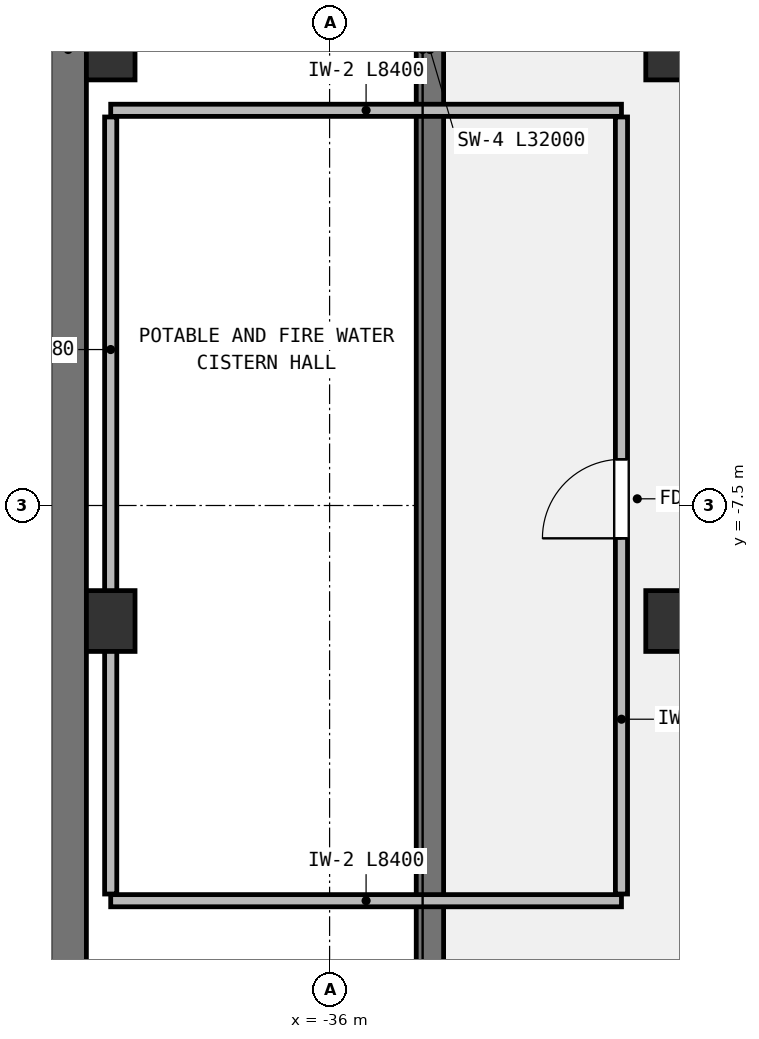
"""IFC4 building model, lengths in metres.
Left out: names, types, materials, properties, quantities, classifications, styles, units other than length and angle.
Written with IfcOpenShell. Run it as: python <this file> out.ifc"""

import sys

from ifc_helpers import new_model, si_unit, direction, frame, frame_2d, origin, origin_2d, place, context, subcontext, project, spatial, rectangle, extrude, element, fill, save


model = new_model("IFC4")
c1 = context("Model", 3, precision=1e-05, world=origin(), true_north=direction((0.0, 1.0)))
c2 = subcontext(c1, "Body", "Model", "MODEL_VIEW")
j1 = project(units=[si_unit("LENGTHUNIT", "METRE"), si_unit("PLANEANGLEUNIT", "RADIAN")], contexts=[c1])
p1 = place(None, origin())
s1 = spatial("IfcSite", under=j1, at=p1, CompositionType="ELEMENT")
p2 = place(p1, origin())
s2 = spatial("IfcBuilding", under=s1, at=p2, CompositionType="ELEMENT")
p3 = place(p2, frame((0.0, 0.0, -13.5)))
s3 = spatial("IfcBuildingStorey", under=s2, at=p3, CompositionType="ELEMENT", Elevation=-13.5)
p4 = place(p3, frame((-40.3, 22.2, 0.0), z_axis=(0.0, 0.0, 1.0), x_axis=(0.0, -1.0, 0.0)))
e1 = element("IfcWall", 1, at=p4, inside=s3, PredefinedType="SOLIDWALL", context=c2, shape_type="SweptSolid", body=[
    extrude(rectangle(XDim=44.4, YDim=0.6, at=frame_2d((22.2, 0.0))), origin(), (0.0, 0.0, 1.0), 4.2),
])
p5 = place(p3, frame((-34.35, -16.0, 0.0), z_axis=(0.0, 0.0, 1.0), x_axis=(0.0, 1.0, 0.0)))
e2 = element("IfcWall", 2, at=p5, inside=s3, PredefinedType="SHEAR", context=c2, shape_type="SweptSolid", body=[
    extrude(rectangle(XDim=32.0, YDim=0.45, at=frame_2d((16.0, 0.0))), origin(), (0.0, 0.0, 1.0), 1.97),
])
for number, where, z_axis, x_axis in (
    (3, (-39.6, -9.4, 0.0), (0.0, 0.0, 1.0), (1.0, 0.0, 0.0)),
    (4, (-39.6, 0.0, 0.0), (0.0, 0.0, 1.0), (1.0, 0.0, 0.0)),
    (5, (-30.4, -9.4, 0.0), (0.0, 0.0, 1.0), (1.0, 0.0, 0.0)),
    (6, (-30.4, 0.0, 0.0), (0.0, 0.0, 1.0), (1.0, 0.0, 0.0)),
):
    element("IfcColumn", number, at=place(p3, frame(where, z_axis=z_axis, x_axis=x_axis)), inside=s3, PredefinedType="COLUMN", context=c2, shape_type="SweptSolid", body=[
        extrude(rectangle(XDim=0.8, YDim=1.0, at=origin_2d()), origin(), (0.0, 0.0, 1.0), 4.5),
    ])
for number, where, z_axis, x_axis in (
    (7, (-39.6, -1.0, 0.0), (0.0, 0.0, 1.0), (1.0, 0.0, 0.0)),
    (8, (-39.6, -14.0, 0.0), (0.0, 0.0, 1.0), (1.0, 0.0, 0.0)),
):
    element("IfcWall", number, at=place(p3, frame(where, z_axis=z_axis, x_axis=x_axis)), inside=s3, PredefinedType="PARTITIONING", context=c2, shape_type="SweptSolid", body=[
        extrude(rectangle(XDim=8.4, YDim=0.2, at=frame_2d((4.2, 0.0))), origin(), (0.0, 0.0, 1.0), 4.2),
    ])
p6 = place(p3, frame((-39.6, -1.11, 0.0), z_axis=(0.0, 0.0, 1.0), x_axis=(0.0, -1.0, 0.0)))
e9 = element("IfcWall", 9, at=p6, inside=s3, PredefinedType="PARTITIONING", context=c2, shape_type="SweptSolid", body=[
    extrude(rectangle(XDim=12.78, YDim=0.2, at=frame_2d((6.39, 0.0))), origin(), (0.0, 0.0, 1.0), 3.18),
])
p7 = place(p3, frame((-31.2, -13.89, 0.0), z_axis=(0.0, 0.0, 1.0), x_axis=(0.0, 1.0, 0.0)))
e10 = element("IfcWall", 10, at=p7, inside=s3, PredefinedType="PARTITIONING", context=c2, shape_type="SweptSolid", body=[
    extrude(rectangle(XDim=12.78, YDim=0.2, at=frame_2d((6.39, 0.0))), origin(), (0.0, 0.0, 1.0), 4.2),
])
p8 = place(p7, frame((5.85, 0.0, 0.0)))
e11 = element("IfcOpeningElement", 11, at=p8, cuts=e10, PredefinedType="OPENING", context=c2, shape_type="SweptSolid", body=[
    extrude(rectangle(XDim=1.3, YDim=2.15, at=frame_2d((0.65, 1.075))), frame((0.0, 0.11, 0.0), z_axis=(0.0, -1.0, 0.0), x_axis=(1.0, 0.0, 0.0)), (0.0, 0.0, 1.0), 0.22),
])
p9 = place(p8, origin())
e12 = element("IfcDoor", 12, at=p9, inside=s3, OperationType="SINGLE_SWING_LEFT", PredefinedType="DOOR", context=c2, shape_type="SweptSolid", body=[
    extrude(rectangle(XDim=1.3, YDim=2.15, at=frame_2d((0.65, 1.075))), frame((0.0, 0.025, 0.0), z_axis=(0.0, -1.0, 0.0), x_axis=(1.0, 0.0, 0.0)), (0.0, 0.0, 1.0), 0.05),
])
fill(e11, e12)
save(model, sys.argv[1])
